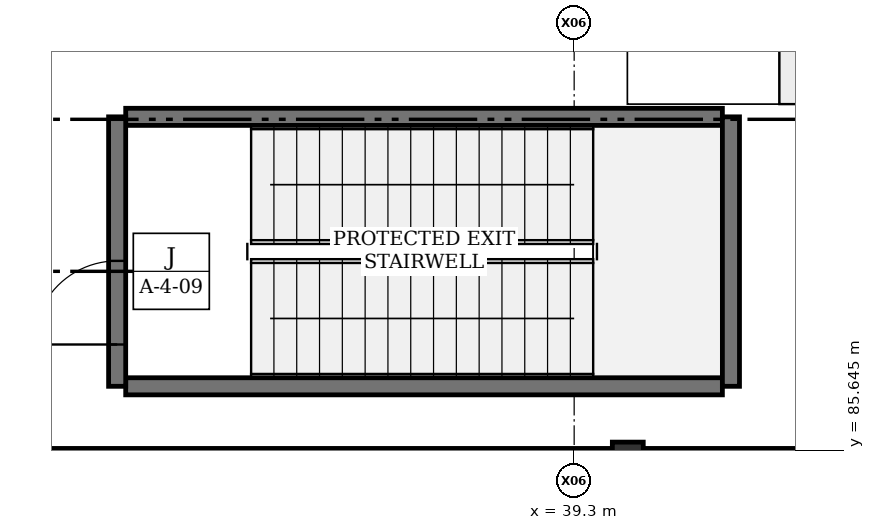
"""IFC4 building model, lengths in metres.
Left out: names, types, materials, properties, quantities, classifications, styles, units other than length and angle.
Written with IfcOpenShell. Run it as: python <this file> out.ifc"""

import sys

from ifc_helpers import new_model, si_unit, direction, frame, frame_2d, origin, origin_2d, place, context, subcontext, project, spatial, rectangle, hollow_circle, extrude, element, fill, save


model = new_model("IFC4")
c1 = context("Model", 3, precision=1e-05, world=origin(), true_north=direction((0.0, 1.0)))
c2 = subcontext(c1, "Body", "Model", "MODEL_VIEW")
j1 = project(units=[si_unit("LENGTHUNIT", "METRE"), si_unit("PLANEANGLEUNIT", "RADIAN")], contexts=[c1])
p1 = place(None, origin())
s1 = spatial("IfcSite", under=j1, at=p1, CompositionType="ELEMENT")
p2 = place(p1, origin())
s2 = spatial("IfcBuilding", under=s1, at=p2, CompositionType="ELEMENT")
p3 = place(p2, origin())
s3 = spatial("IfcBuildingStorey", under=s2, at=p3, CompositionType="ELEMENT", Elevation=0.0)
p4 = place(p3, frame((40.006, 85.55, 0.0), z_axis=(0.0, 0.0, 1.0), x_axis=(1.0, 0.0, 0.0)))
e1 = element("IfcColumn", 1, at=p4, inside=s3, PredefinedType="COLUMN", context=c2, shape_type="SweptSolid", body=[
    extrude(hollow_circle(Radius=0.203, WallThickness=0.016, at=origin_2d()), origin(), (0.0, 0.0, 1.0), 5.4),
])
p5 = place(p3, frame((39.804, 85.55, 0.0), z_axis=(0.0, 0.0, 1.0), x_axis=(-1.0, 0.0, 0.0)))
e2 = element("IfcWall", 2, at=p5, inside=s3, PredefinedType="SOLIDWALL", context=c2, shape_type="SweptSolid", body=[
    extrude(rectangle(XDim=8.953, YDim=0.24, at=frame_2d((4.477, 0.0))), origin(), (0.0, 0.0, 1.0), 4.7),
])
p6 = place(p5, frame((0.899, 0.0, 0.92)))
e3 = element("IfcOpeningElement", 3, at=p6, cuts=e2, PredefinedType="OPENING", context=c2, shape_type="SweptSolid", body=[
    extrude(rectangle(XDim=2.4, YDim=1.55, at=frame_2d((1.2, 0.775))), frame((0.0, 0.12, 0.0), z_axis=(0.0, -1.0, 0.0), x_axis=(1.0, 0.0, 0.0)), (0.0, 0.0, 1.0), 0.24),
])
p7 = place(p5, frame((7.004, 0.0, 0.92)))
e4 = element("IfcOpeningElement", 4, at=p7, cuts=e2, PredefinedType="OPENING", context=c2, shape_type="SweptSolid", body=[
    extrude(rectangle(XDim=1.05, YDim=1.3, at=frame_2d((0.525, 0.65))), frame((0.0, 0.12, 0.0), z_axis=(0.0, -1.0, 0.0), x_axis=(1.0, 0.0, 0.0)), (0.0, 0.0, 1.0), 0.24),
])
p8 = place(p3, frame((49.16, 85.55, 0.0), z_axis=(0.0, 0.0, 1.0), x_axis=(-1.0, 0.0, 0.0)))
e5 = element("IfcWall", 5, at=p8, inside=s3, PredefinedType="SOLIDWALL", context=c2, shape_type="SweptSolid", body=[
    extrude(rectangle(XDim=8.953, YDim=0.24, at=frame_2d((4.477, 0.0))), origin(), (0.0, 0.0, 1.0), 4.7),
])
p9 = place(p8, frame((0.899, 0.0, 0.92)))
e6 = element("IfcOpeningElement", 6, at=p9, cuts=e5, PredefinedType="OPENING", context=c2, shape_type="SweptSolid", body=[
    extrude(rectangle(XDim=1.2, YDim=1.7, at=frame_2d((0.6, 0.85))), frame((0.0, 0.12, 0.0), z_axis=(0.0, -1.0, 0.0), x_axis=(1.0, 0.0, 0.0)), (0.0, 0.0, 1.0), 0.24),
])
p10 = place(p8, frame((6.454, 0.0, 0.92)))
e7 = element("IfcOpeningElement", 7, at=p10, cuts=e5, PredefinedType="OPENING", context=c2, shape_type="SweptSolid", body=[
    extrude(rectangle(XDim=1.6, YDim=1.35, at=frame_2d((0.8, 0.675))), frame((0.0, 0.12, 0.0), z_axis=(0.0, -1.0, 0.0), x_axis=(1.0, 0.0, 0.0)), (0.0, 0.0, 1.0), 0.24),
])
for number, where, z_axis, x_axis in (
    (8, (33.4, 86.488, 0.0), (0.0, 0.0, 1.0), (1.0, 0.0, 0.0)),
    (9, (33.4, 90.032, 0.0), (0.0, 0.0, 1.0), (1.0, 0.0, 0.0)),
):
    element("IfcWall", number, at=place(p3, frame(where, z_axis=z_axis, x_axis=x_axis)), inside=s3, PredefinedType="SHEAR", context=c2, shape_type="SweptSolid", body=[
        extrude(rectangle(XDim=7.85, YDim=0.225, at=frame_2d((3.925, 0.0))), origin(), (0.0, 0.0, 1.0), 5.4),
    ])
p11 = place(p3, frame((41.363, 86.488, 0.0), z_axis=(0.0, 0.0, 1.0), x_axis=(0.0, 1.0, 0.0)))
e10 = element("IfcWall", 10, at=p11, inside=s3, PredefinedType="SHEAR", context=c2, shape_type="SweptSolid", body=[
    extrude(rectangle(XDim=3.545, YDim=0.225, at=frame_2d((1.772, 0.0))), origin(), (0.0, 0.0, 1.0), 5.4),
])
p12 = place(p3, frame((33.288, 86.488, 0.0), z_axis=(0.0, 0.0, 1.0), x_axis=(0.0, 1.0, 0.0)))
e11 = element("IfcWall", 11, at=p12, inside=s3, PredefinedType="SHEAR", context=c2, shape_type="SweptSolid", body=[
    extrude(rectangle(XDim=3.545, YDim=0.225, at=frame_2d((1.772, 0.0))), origin(), (0.0, 0.0, 1.0), 5.4),
])
p13 = place(p12, frame((0.55, 0.0, 0.0)))
e12 = element("IfcOpeningElement", 12, at=p13, cuts=e11, PredefinedType="OPENING", context=c2, shape_type="SweptSolid", body=[
    extrude(rectangle(XDim=1.1, YDim=2.15, at=frame_2d((0.55, 1.075))), frame((0.0, 0.113, 0.0), z_axis=(0.0, -1.0, 0.0), x_axis=(1.0, 0.0, 0.0)), (0.0, 0.0, 1.0), 0.225),
])
p14 = place(p13, origin())
e13 = element("IfcDoor", 13, at=p14, inside=s3, OperationType="SINGLE_SWING_LEFT", PredefinedType="DOOR", context=c2, shape_type="SweptSolid", body=[
    extrude(rectangle(XDim=1.1, YDim=2.15, at=frame_2d((0.55, 1.075))), frame((0.0, 0.025, 0.0), z_axis=(0.0, -1.0, 0.0), x_axis=(1.0, 0.0, 0.0)), (0.0, 0.0, 1.0), 0.05),
])
fill(e12, e13)
save(model, sys.argv[1])
